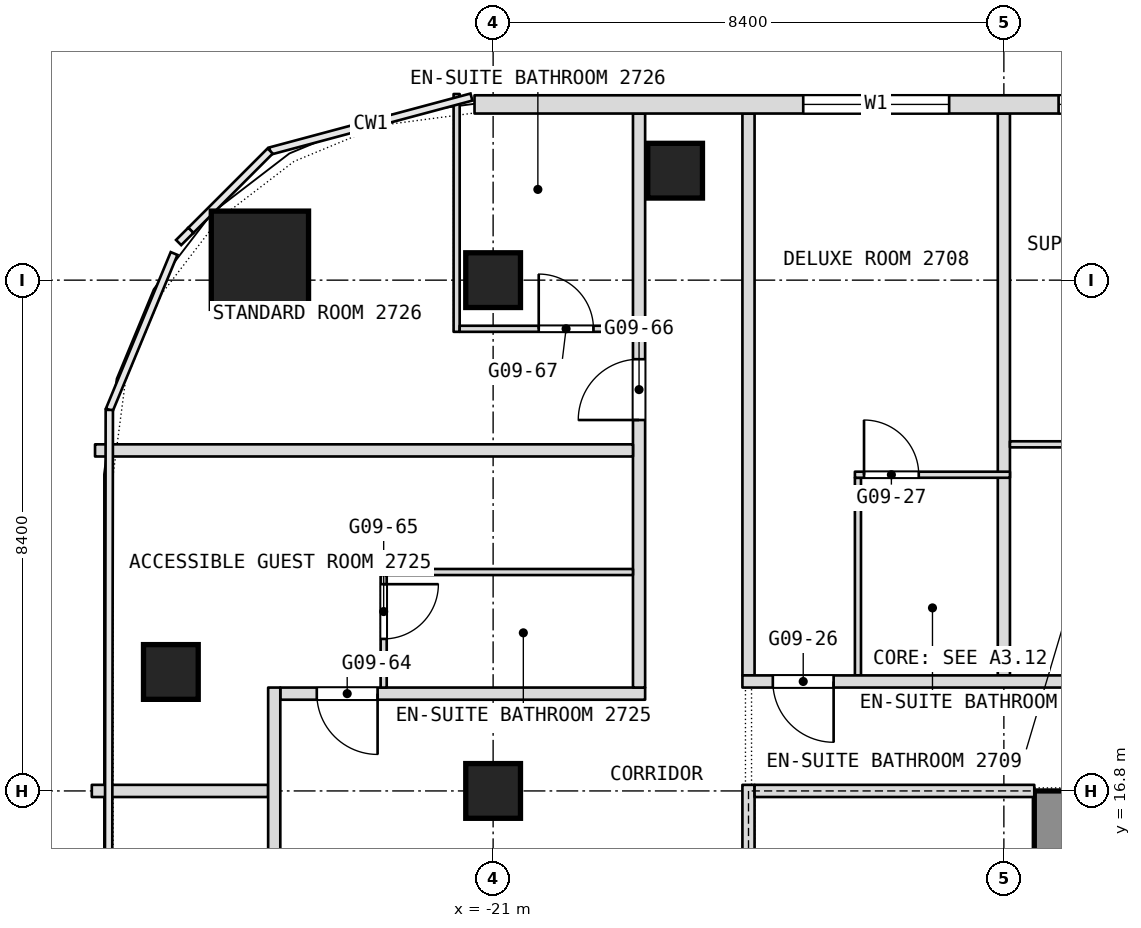
"""IFC4 building model, lengths in metres.
Left out: names, types, materials, properties, quantities, classifications, styles, units other than length and angle.
Written with IfcOpenShell. Run it as: python <this file> out.ifc"""

import sys

from ifc_helpers import new_model, si_unit, direction, frame, frame_2d, origin, origin_2d, place, context, subcontext, project, spatial, rectangle, extrude, element, fill, save


model = new_model("IFC4")
c1 = context("Model", 3, precision=1e-05, world=origin(), true_north=direction((0.0, 1.0)))
c2 = subcontext(c1, "Body", "Model", "MODEL_VIEW")
j1 = project(units=[si_unit("LENGTHUNIT", "METRE"), si_unit("PLANEANGLEUNIT", "RADIAN")], contexts=[c1])
p1 = place(None, origin())
s1 = spatial("IfcSite", under=j1, at=p1, CompositionType="ELEMENT")
p2 = place(p1, origin())
s2 = spatial("IfcBuilding", under=s1, at=p2, CompositionType="ELEMENT")
p3 = place(p2, frame((0.0, 0.0, 122.9)))
s3 = spatial("IfcBuildingStorey", under=s2, at=p3, CompositionType="ELEMENT", Elevation=122.9)
p4 = place(p3, frame((-11.6, 0.0, 0.0), z_axis=(0.0, 0.0, 1.0), x_axis=(0.0, 1.0, 0.0)))
e1 = element("IfcWall", 1, at=p4, inside=s3, PredefinedType="SHEAR", context=c2, shape_type="SweptSolid", body=[
    extrude(rectangle(XDim=16.8, YDim=1.0, at=frame_2d((8.4, 0.0))), origin(), (0.0, 0.0, 1.0), 3.6),
])
p5 = place(p4, frame((3.6, 0.0, 0.0)))
e2 = element("IfcOpeningElement", 2, at=p5, cuts=e1, PredefinedType="OPENING", context=c2, shape_type="SweptSolid", body=[
    extrude(rectangle(XDim=0.9, YDim=2.1, at=frame_2d((0.45, 1.05))), frame((0.0, 0.5, 0.0), z_axis=(0.0, -1.0, 0.0), x_axis=(1.0, 0.0, 0.0)), (0.0, 0.0, 1.0), 1.0),
])
p6 = place(p4, frame((6.825, 0.0, 0.0)))
e3 = element("IfcOpeningElement", 3, at=p6, cuts=e1, PredefinedType="OPENING", context=c2, shape_type="SweptSolid", body=[
    extrude(rectangle(XDim=1.2, YDim=2.1, at=frame_2d((0.6, 1.05))), frame((0.0, 0.5, 0.0), z_axis=(0.0, -1.0, 0.0), x_axis=(1.0, 0.0, 0.0)), (0.0, 0.0, 1.0), 1.0),
])
p7 = place(p4, frame((14.137, 0.0, 0.0)))
e4 = element("IfcOpeningElement", 4, at=p7, cuts=e1, PredefinedType="OPENING", context=c2, shape_type="SweptSolid", body=[
    extrude(rectangle(XDim=0.9, YDim=2.1, at=frame_2d((0.45, 1.05))), frame((0.0, 0.5, 0.0), z_axis=(0.0, -1.0, 0.0), x_axis=(1.0, 0.0, 0.0)), (0.0, 0.0, 1.0), 1.0),
])
p8 = place(p4, frame((11.512, 0.0, 0.0)))
e5 = element("IfcOpeningElement", 5, at=p8, cuts=e1, PredefinedType="OPENING", context=c2, shape_type="SweptSolid", body=[
    extrude(rectangle(XDim=0.9, YDim=2.1, at=frame_2d((0.45, 1.05))), frame((0.0, 0.5, 0.0), z_axis=(0.0, -1.0, 0.0), x_axis=(1.0, 0.0, 0.0)), (0.0, 0.0, 1.0), 1.0),
])
p9 = place(p4, frame((8.775, 0.0, 0.0)))
e6 = element("IfcOpeningElement", 6, at=p9, cuts=e1, PredefinedType="OPENING", context=c2, shape_type="SweptSolid", body=[
    extrude(rectangle(XDim=1.2, YDim=2.1, at=frame_2d((0.6, 1.05))), frame((0.0, 0.5, 0.0), z_axis=(0.0, -1.0, 0.0), x_axis=(1.0, 0.0, 0.0)), (0.0, 0.0, 1.0), 1.0),
])
p10 = place(p3, frame((-24.835, 25.535, 0.0), z_axis=(0.0, 0.0, 1.0), x_axis=(1.0, 0.0, 0.0)))
e7 = element("IfcColumn", 7, at=p10, inside=s3, PredefinedType="COLUMN", context=c2, shape_type="SweptSolid", body=[
    extrude(rectangle(XDim=1.6, YDim=1.6, at=origin_2d()), origin(), (0.0, 0.0, 1.0), 3.6),
])
for number, where, z_axis, x_axis in (
    (8, (-21.0, 16.8, 0.0), (0.0, 0.0, 1.0), (1.0, 0.0, 0.0)),
    (9, (-21.0, 25.2, 0.0), (0.0, 0.0, 1.0), (1.0, 0.0, 0.0)),
    (10, (-26.3, 18.756, 0.0), (0.0, 0.0, 1.0), (1.0, 0.0, 0.0)),
    (11, (-18.007, 27.0, 0.0), (0.0, 0.0, 1.0), (1.0, 0.0, 0.0)),
):
    element("IfcColumn", number, at=place(p3, frame(where, z_axis=z_axis, x_axis=x_axis)), inside=s3, PredefinedType="COLUMN", context=c2, shape_type="SweptSolid", body=[
        extrude(rectangle(XDim=0.9, YDim=0.9, at=origin_2d()), origin(), (0.0, 0.0, 1.0), 3.6),
    ])
p11 = place(p3, frame((-12.6, 18.7, 0.0), z_axis=(0.0, 0.0, 1.0), x_axis=(0.0, 1.0, 0.0)))
e12 = element("IfcWall", 12, at=p11, inside=s3, PredefinedType="PARTITIONING", context=c2, shape_type="SweptSolid", body=[
    extrude(rectangle(XDim=9.24, YDim=0.2, at=frame_2d((4.62, 0.0))), origin(), (0.0, 0.0, 1.0), 3.34),
])
p12 = place(p3, frame((-15.0, 18.7, 0.0), z_axis=(0.0, 0.0, 1.0), x_axis=(0.0, 1.0, 0.0)))
e13 = element("IfcWall", 13, at=p12, inside=s3, PredefinedType="PARTITIONING", context=c2, shape_type="SweptSolid", body=[
    extrude(rectangle(XDim=3.25, YDim=0.1, at=frame_2d((1.625, 0.0))), origin(), (0.0, 0.0, 1.0), 3.34),
])
p13 = place(p3, frame((-16.8, 18.7, 0.0), z_axis=(0.0, 0.0, 1.0), x_axis=(0.0, 1.0, 0.0)))
e14 = element("IfcWall", 14, at=p13, inside=s3, PredefinedType="PARTITIONING", context=c2, shape_type="SweptSolid", body=[
    extrude(rectangle(XDim=9.24, YDim=0.2, at=frame_2d((4.62, 0.0))), origin(), (0.0, 0.0, 1.0), 3.34),
])
p14 = place(p3, frame((-27.6, 16.8, 0.0), z_axis=(0.0, 0.0, 1.0), x_axis=(1.0, 0.0, 0.0)))
e15 = element("IfcWall", 15, at=p14, inside=s3, PredefinedType="PARTITIONING", context=c2, shape_type="SweptSolid", body=[
    extrude(rectangle(XDim=2.9, YDim=0.2, at=frame_2d((1.45, 0.0))), origin(), (0.0, 0.0, 1.0), 2.89),
])
p15 = place(p3, frame((-24.5, 18.4, 0.0), z_axis=(0.0, 0.0, 1.0), x_axis=(1.0, 0.0, 0.0)))
e16 = element("IfcWall", 16, at=p15, inside=s3, PredefinedType="PARTITIONING", context=c2, shape_type="SweptSolid", body=[
    extrude(rectangle(XDim=6.0, YDim=0.2, at=frame_2d((3.0, 0.0))), origin(), (0.0, 0.0, 1.0), 3.34),
])
p16 = place(p15, frame((0.6, 0.0, 0.0)))
e17 = element("IfcOpeningElement", 17, at=p16, cuts=e16, PredefinedType="OPENING", context=c2, shape_type="SweptSolid", body=[
    extrude(rectangle(XDim=1.0, YDim=2.1, at=frame_2d((0.5, 1.05))), frame((0.0, 0.1, 0.0), z_axis=(0.0, -1.0, 0.0), x_axis=(1.0, 0.0, 0.0)), (0.0, 0.0, 1.0), 0.2),
])
p17 = place(p3, frame((-18.6, 18.5, 0.0), z_axis=(0.0, 0.0, 1.0), x_axis=(0.0, 1.0, 0.0)))
e18 = element("IfcWall", 18, at=p17, inside=s3, PredefinedType="PARTITIONING", context=c2, shape_type="SweptSolid", body=[
    extrude(rectangle(XDim=9.44, YDim=0.2, at=frame_2d((4.72, 0.0))), origin(), (0.0, 0.0, 1.0), 3.34),
])
p18 = place(p17, frame((4.4, 0.0, 0.0)))
e19 = element("IfcOpeningElement", 19, at=p18, cuts=e18, PredefinedType="OPENING", context=c2, shape_type="SweptSolid", body=[
    extrude(rectangle(XDim=1.0, YDim=2.1, at=frame_2d((0.5, 1.05))), frame((0.0, 0.1, 0.0), z_axis=(0.0, -1.0, 0.0), x_axis=(1.0, 0.0, 0.0)), (0.0, 0.0, 1.0), 0.2),
])
p19 = place(p3, frame((-16.9, 18.6, 0.0), z_axis=(0.0, 0.0, 1.0), x_axis=(1.0, 0.0, 0.0)))
e20 = element("IfcWall", 20, at=p19, inside=s3, PredefinedType="PARTITIONING", context=c2, shape_type="SweptSolid", body=[
    extrude(rectangle(XDim=18.4, YDim=0.2, at=frame_2d((9.2, 0.0))), origin(), (0.0, 0.0, 1.0), 3.34),
])
p20 = place(p19, frame((0.5, 0.0, 0.0)))
e21 = element("IfcOpeningElement", 21, at=p20, cuts=e20, PredefinedType="OPENING", context=c2, shape_type="SweptSolid", body=[
    extrude(rectangle(XDim=1.0, YDim=2.1, at=frame_2d((0.5, 1.05))), frame((0.0, 0.1, 0.0), z_axis=(0.0, -1.0, 0.0), x_axis=(1.0, 0.0, 0.0)), (0.0, 0.0, 1.0), 0.2),
])
p21 = place(p19, frame((7.1, 0.0, 0.0)))
e22 = element("IfcOpeningElement", 22, at=p21, cuts=e20, PredefinedType="OPENING", context=c2, shape_type="SweptSolid", body=[
    extrude(rectangle(XDim=1.0, YDim=2.1, at=frame_2d((0.5, 1.05))), frame((0.0, 0.1, 0.0), z_axis=(0.0, -1.0, 0.0), x_axis=(1.0, 0.0, 0.0)), (0.0, 0.0, 1.0), 0.2),
])
p22 = place(p19, frame((8.9, 0.0, 0.0)))
e23 = element("IfcOpeningElement", 23, at=p22, cuts=e20, PredefinedType="OPENING", context=c2, shape_type="SweptSolid", body=[
    extrude(rectangle(XDim=1.0, YDim=2.1, at=frame_2d((0.5, 1.05))), frame((0.0, 0.1, 0.0), z_axis=(0.0, -1.0, 0.0), x_axis=(1.0, 0.0, 0.0)), (0.0, 0.0, 1.0), 0.2),
])
p23 = place(p19, frame((13.1, 0.0, 0.0)))
e24 = element("IfcOpeningElement", 24, at=p23, cuts=e20, PredefinedType="OPENING", context=c2, shape_type="SweptSolid", body=[
    extrude(rectangle(XDim=1.0, YDim=2.1, at=frame_2d((0.5, 1.05))), frame((0.0, 0.1, 0.0), z_axis=(0.0, -1.0, 0.0), x_axis=(1.0, 0.0, 0.0)), (0.0, 0.0, 1.0), 0.2),
])
p24 = place(p3, frame((-22.85, 20.4, 0.0), z_axis=(0.0, 0.0, 1.0), x_axis=(1.0, 0.0, 0.0)))
e25 = element("IfcWall", 25, at=p24, inside=s3, PredefinedType="PARTITIONING", context=c2, shape_type="SweptSolid", body=[
    extrude(rectangle(XDim=4.15, YDim=0.1, at=frame_2d((2.075, 0.0))), origin(), (0.0, 0.0, 1.0), 3.34),
])
p25 = place(p3, frame((-21.6, 24.35, 0.0), z_axis=(0.0, 0.0, 1.0), x_axis=(0.0, 1.0, 0.0)))
e26 = element("IfcWall", 26, at=p25, inside=s3, PredefinedType="PARTITIONING", context=c2, shape_type="SweptSolid", body=[
    extrude(rectangle(XDim=3.911, YDim=0.1, at=frame_2d((1.956, 0.0))), origin(), (0.0, 0.0, 1.0), 3.34),
])
p26 = place(p3, frame((-15.05, 22.0, 0.0), z_axis=(0.0, 0.0, 1.0), x_axis=(1.0, 0.0, 0.0)))
e27 = element("IfcWall", 27, at=p26, inside=s3, PredefinedType="PARTITIONING", context=c2, shape_type="SweptSolid", body=[
    extrude(rectangle(XDim=2.55, YDim=0.1, at=frame_2d((1.275, 0.0))), origin(), (0.0, 0.0, 1.0), 3.34),
])
p27 = place(p26, frame((0.15, 0.0, 0.0)))
e28 = element("IfcOpeningElement", 28, at=p27, cuts=e27, PredefinedType="OPENING", context=c2, shape_type="SweptSolid", body=[
    extrude(rectangle(XDim=0.9, YDim=2.1, at=frame_2d((0.45, 1.05))), frame((0.0, 0.05, 0.0), z_axis=(0.0, -1.0, 0.0), x_axis=(1.0, 0.0, 0.0)), (0.0, 0.0, 1.0), 0.1),
])
p28 = place(p3, frame((-27.547, 22.4, 0.0), z_axis=(0.0, 0.0, 1.0), x_axis=(1.0, 0.0, 0.0)))
e29 = element("IfcWall", 29, at=p28, inside=s3, PredefinedType="PARTITIONING", context=c2, shape_type="SweptSolid", body=[
    extrude(rectangle(XDim=8.847, YDim=0.2, at=frame_2d((4.424, 0.0))), origin(), (0.0, 0.0, 1.0), 3.34),
])
p29 = place(p3, frame((-12.5, 22.5, 0.0), z_axis=(0.0, 0.0, 1.0), x_axis=(1.0, 0.0, 0.0)))
e30 = element("IfcWall", 30, at=p29, inside=s3, PredefinedType="PARTITIONING", context=c2, shape_type="SweptSolid", body=[
    extrude(rectangle(XDim=2.25, YDim=0.1, at=frame_2d((1.125, 0.0))), origin(), (0.0, 0.0, 1.0), 3.34),
])
p30 = place(p29, frame((1.2, 0.0, 0.0)))
e31 = element("IfcOpeningElement", 31, at=p30, cuts=e30, PredefinedType="OPENING", context=c2, shape_type="SweptSolid", body=[
    extrude(rectangle(XDim=0.9, YDim=2.1, at=frame_2d((0.45, 1.05))), frame((0.0, 0.05, 0.0), z_axis=(0.0, -1.0, 0.0), x_axis=(1.0, 0.0, 0.0)), (0.0, 0.0, 1.0), 0.1),
])
p31 = place(p3, frame((-22.8, 18.5, 0.0), z_axis=(0.0, 0.0, 1.0), x_axis=(0.0, 1.0, 0.0)))
e32 = element("IfcWall", 32, at=p31, inside=s3, PredefinedType="PARTITIONING", context=c2, shape_type="SweptSolid", body=[
    extrude(rectangle(XDim=1.85, YDim=0.1, at=frame_2d((0.925, 0.0))), origin(), (0.0, 0.0, 1.0), 3.34),
])
p32 = place(p31, frame((0.8, 0.0, 0.0)))
e33 = element("IfcOpeningElement", 33, at=p32, cuts=e32, PredefinedType="OPENING", context=c2, shape_type="SweptSolid", body=[
    extrude(rectangle(XDim=0.9, YDim=2.1, at=frame_2d((0.45, 1.05))), frame((0.0, 0.05, 0.0), z_axis=(0.0, -1.0, 0.0), x_axis=(1.0, 0.0, 0.0)), (0.0, 0.0, 1.0), 0.1),
])
p33 = place(p3, frame((-21.55, 24.4, 0.0), z_axis=(0.0, 0.0, 1.0), x_axis=(1.0, 0.0, 0.0)))
e34 = element("IfcWall", 34, at=p33, inside=s3, PredefinedType="PARTITIONING", context=c2, shape_type="SweptSolid", body=[
    extrude(rectangle(XDim=2.85, YDim=0.1, at=frame_2d((1.425, 0.0))), origin(), (0.0, 0.0, 1.0), 3.34),
])
p34 = place(p33, frame((1.3, 0.0, 0.0)))
e35 = element("IfcOpeningElement", 35, at=p34, cuts=e34, PredefinedType="OPENING", context=c2, shape_type="SweptSolid", body=[
    extrude(rectangle(XDim=0.9, YDim=2.1, at=frame_2d((0.45, 1.05))), frame((0.0, 0.05, 0.0), z_axis=(0.0, -1.0, 0.0), x_axis=(1.0, 0.0, 0.0)), (0.0, 0.0, 1.0), 0.1),
])
p35 = place(p3, frame((-24.6, 6.9, 0.0), z_axis=(0.0, 0.0, 1.0), x_axis=(0.0, 1.0, 0.0)))
e36 = element("IfcWall", 36, at=p35, inside=s3, PredefinedType="PARTITIONING", context=c2, shape_type="SweptSolid", body=[
    extrude(rectangle(XDim=11.6, YDim=0.2, at=frame_2d((5.8, 0.0))), origin(), (0.0, 0.0, 1.0), 3.34),
])
p36 = place(p35, frame((5.45, 0.0, 0.0)))
e37 = element("IfcOpeningElement", 37, at=p36, cuts=e36, PredefinedType="OPENING", context=c2, shape_type="SweptSolid", body=[
    extrude(rectangle(XDim=1.8, YDim=2.1, at=frame_2d((0.9, 1.05))), frame((0.0, 0.1, 0.0), z_axis=(0.0, -1.0, 0.0), x_axis=(1.0, 0.0, 0.0)), (0.0, 0.0, 1.0), 0.2),
])
p37 = place(p35, frame((0.3, 0.0, 0.0)))
e38 = element("IfcOpeningElement", 38, at=p37, cuts=e36, PredefinedType="OPENING", context=c2, shape_type="SweptSolid", body=[
    extrude(rectangle(XDim=1.0, YDim=2.1, at=frame_2d((0.5, 1.05))), frame((0.0, 0.1, 0.0), z_axis=(0.0, -1.0, 0.0), x_axis=(1.0, 0.0, 0.0)), (0.0, 0.0, 1.0), 0.2),
])
p38 = place(p3, frame((21.306, 28.09, 0.0), z_axis=(0.0, 0.0, 1.0), x_axis=(-1.0, 0.0, 0.0)))
e39 = element("IfcWall", 39, at=p38, inside=s3, PredefinedType="NOTDEFINED", context=c2, shape_type="SweptSolid", body=[
    extrude(rectangle(XDim=42.612, YDim=0.3, at=frame_2d((21.306, 0.0))), origin(), (0.0, 0.0, 1.0), 3.6),
])
p39 = place(p38, frame((5.406, 0.0, 0.9)))
e40 = element("IfcOpeningElement", 40, at=p39, cuts=e39, PredefinedType="OPENING", context=c2, shape_type="SweptSolid", body=[
    extrude(rectangle(XDim=2.4, YDim=2.1, at=frame_2d((1.2, 1.05))), frame((0.0, 0.15, 0.0), z_axis=(0.0, -1.0, 0.0), x_axis=(1.0, 0.0, 0.0)), (0.0, 0.0, 1.0), 0.3),
])
p40 = place(p38, frame((9.606, 0.0, 0.9)))
e41 = element("IfcOpeningElement", 41, at=p40, cuts=e39, PredefinedType="OPENING", context=c2, shape_type="SweptSolid", body=[
    extrude(rectangle(XDim=2.4, YDim=2.1, at=frame_2d((1.2, 1.05))), frame((0.0, 0.15, 0.0), z_axis=(0.0, -1.0, 0.0), x_axis=(1.0, 0.0, 0.0)), (0.0, 0.0, 1.0), 0.3),
])
p41 = place(p38, frame((13.806, 0.0, 0.9)))
e42 = element("IfcOpeningElement", 42, at=p41, cuts=e39, PredefinedType="OPENING", context=c2, shape_type="SweptSolid", body=[
    extrude(rectangle(XDim=2.4, YDim=2.1, at=frame_2d((1.2, 1.05))), frame((0.0, 0.15, 0.0), z_axis=(0.0, -1.0, 0.0), x_axis=(1.0, 0.0, 0.0)), (0.0, 0.0, 1.0), 0.3),
])
p42 = place(p38, frame((18.006, 0.0, 0.9)))
e43 = element("IfcOpeningElement", 43, at=p42, cuts=e39, PredefinedType="OPENING", context=c2, shape_type="SweptSolid", body=[
    extrude(rectangle(XDim=2.4, YDim=2.1, at=frame_2d((1.2, 1.05))), frame((0.0, 0.15, 0.0), z_axis=(0.0, -1.0, 0.0), x_axis=(1.0, 0.0, 0.0)), (0.0, 0.0, 1.0), 0.3),
])
p43 = place(p38, frame((22.206, 0.0, 0.9)))
e44 = element("IfcOpeningElement", 44, at=p43, cuts=e39, PredefinedType="OPENING", context=c2, shape_type="SweptSolid", body=[
    extrude(rectangle(XDim=2.4, YDim=2.1, at=frame_2d((1.2, 1.05))), frame((0.0, 0.15, 0.0), z_axis=(0.0, -1.0, 0.0), x_axis=(1.0, 0.0, 0.0)), (0.0, 0.0, 1.0), 0.3),
])
p44 = place(p38, frame((26.406, 0.0, 0.9)))
e45 = element("IfcOpeningElement", 45, at=p44, cuts=e39, PredefinedType="OPENING", context=c2, shape_type="SweptSolid", body=[
    extrude(rectangle(XDim=2.4, YDim=2.1, at=frame_2d((1.2, 1.05))), frame((0.0, 0.15, 0.0), z_axis=(0.0, -1.0, 0.0), x_axis=(1.0, 0.0, 0.0)), (0.0, 0.0, 1.0), 0.3),
])
p45 = place(p38, frame((30.606, 0.0, 0.9)))
e46 = element("IfcOpeningElement", 46, at=p45, cuts=e39, PredefinedType="OPENING", context=c2, shape_type="SweptSolid", body=[
    extrude(rectangle(XDim=2.4, YDim=2.1, at=frame_2d((1.2, 1.05))), frame((0.0, 0.15, 0.0), z_axis=(0.0, -1.0, 0.0), x_axis=(1.0, 0.0, 0.0)), (0.0, 0.0, 1.0), 0.3),
])
p46 = place(p38, frame((34.806, 0.0, 0.9)))
e47 = element("IfcOpeningElement", 47, at=p46, cuts=e39, PredefinedType="OPENING", context=c2, shape_type="SweptSolid", body=[
    extrude(rectangle(XDim=2.4, YDim=2.1, at=frame_2d((1.2, 1.05))), frame((0.0, 0.15, 0.0), z_axis=(0.0, -1.0, 0.0), x_axis=(1.0, 0.0, 0.0)), (0.0, 0.0, 1.0), 0.3),
])
p47 = place(p3, frame((-16.8, -0.1, 0.0), z_axis=(0.0, 0.0, 1.0), x_axis=(0.0, 1.0, 0.0)))
e48 = element("IfcWall", 48, at=p47, inside=s3, PredefinedType="PARTITIONING", context=c2, shape_type="SweptSolid", body=[
    extrude(rectangle(XDim=17.0, YDim=0.2, at=frame_2d((8.5, 0.0))), origin(), (0.0, 0.0, 1.0), 3.34),
])
p48 = place(p47, frame((2.2, 0.0, 0.0)))
e49 = element("IfcOpeningElement", 49, at=p48, cuts=e48, PredefinedType="OPENING", context=c2, shape_type="SweptSolid", body=[
    extrude(rectangle(XDim=1.8, YDim=2.1, at=frame_2d((0.9, 1.05))), frame((0.0, 0.1, 0.0), z_axis=(0.0, -1.0, 0.0), x_axis=(1.0, 0.0, 0.0)), (0.0, 0.0, 1.0), 0.2),
])
p49 = place(p47, frame((7.2, 0.0, 0.0)))
e50 = element("IfcOpeningElement", 50, at=p49, cuts=e48, PredefinedType="OPENING", context=c2, shape_type="SweptSolid", body=[
    extrude(rectangle(XDim=1.8, YDim=2.1, at=frame_2d((0.9, 1.05))), frame((0.0, 0.1, 0.0), z_axis=(0.0, -1.0, 0.0), x_axis=(1.0, 0.0, 0.0)), (0.0, 0.0, 1.0), 0.2),
])
p50 = place(p3, frame((-16.7, 16.8, 0.0), z_axis=(0.0, 0.0, 1.0), x_axis=(1.0, 0.0, 0.0)))
e51 = element("IfcWall", 51, at=p50, inside=s3, PredefinedType="PARTITIONING", context=c2, shape_type="SweptSolid", body=[
    extrude(rectangle(XDim=4.6, YDim=0.2, at=frame_2d((2.3, 0.0))), origin(), (0.0, 0.0, 1.0), 2.89),
])
p51 = place(p16, origin())
e52 = element("IfcDoor", 52, at=p51, inside=s3, OperationType="SINGLE_SWING_RIGHT", PredefinedType="DOOR", context=c2, shape_type="SweptSolid", body=[
    extrude(rectangle(XDim=1.0, YDim=2.1, at=frame_2d((0.5, 1.05))), frame((0.0, 0.025, 0.0), z_axis=(0.0, -1.0, 0.0), x_axis=(1.0, 0.0, 0.0)), (0.0, 0.0, 1.0), 0.05),
])
fill(e17, e52)
p52 = place(p18, origin())
e53 = element("IfcDoor", 53, at=p52, inside=s3, OperationType="SINGLE_SWING_LEFT", PredefinedType="DOOR", context=c2, shape_type="SweptSolid", body=[
    extrude(rectangle(XDim=1.0, YDim=2.1, at=frame_2d((0.5, 1.05))), frame((0.0, 0.025, 0.0), z_axis=(0.0, -1.0, 0.0), x_axis=(1.0, 0.0, 0.0)), (0.0, 0.0, 1.0), 0.05),
])
fill(e19, e53)
p53 = place(p20, origin())
e54 = element("IfcDoor", 54, at=p53, inside=s3, OperationType="SINGLE_SWING_LEFT", PredefinedType="DOOR", context=c2, shape_type="SweptSolid", body=[
    extrude(rectangle(XDim=1.0, YDim=2.1, at=frame_2d((0.5, 1.05))), frame((0.0, 0.025, 0.0), z_axis=(0.0, -1.0, 0.0), x_axis=(1.0, 0.0, 0.0)), (0.0, 0.0, 1.0), 0.05),
])
fill(e21, e54)
p54 = place(p27, origin())
e55 = element("IfcDoor", 55, at=p54, inside=s3, OperationType="SINGLE_SWING_RIGHT", PredefinedType="DOOR", context=c2, shape_type="SweptSolid", body=[
    extrude(rectangle(XDim=0.9, YDim=2.1, at=frame_2d((0.45, 1.05))), frame((0.0, 0.025, 0.0), z_axis=(0.0, -1.0, 0.0), x_axis=(1.0, 0.0, 0.0)), (0.0, 0.0, 1.0), 0.05),
])
fill(e28, e55)
p55 = place(p32, origin())
e56 = element("IfcDoor", 56, at=p55, inside=s3, OperationType="SINGLE_SWING_LEFT", PredefinedType="DOOR", context=c2, shape_type="SweptSolid", body=[
    extrude(rectangle(XDim=0.9, YDim=2.1, at=frame_2d((0.45, 1.05))), frame((0.0, 0.025, 0.0), z_axis=(0.0, -1.0, 0.0), x_axis=(1.0, 0.0, 0.0)), (0.0, 0.0, 1.0), 0.05),
])
fill(e33, e56)
p56 = place(p34, origin())
e57 = element("IfcDoor", 57, at=p56, inside=s3, OperationType="SINGLE_SWING_LEFT", PredefinedType="DOOR", context=c2, shape_type="SweptSolid", body=[
    extrude(rectangle(XDim=0.9, YDim=2.1, at=frame_2d((0.45, 1.05))), frame((0.0, 0.025, 0.0), z_axis=(0.0, -1.0, 0.0), x_axis=(1.0, 0.0, 0.0)), (0.0, 0.0, 1.0), 0.05),
])
fill(e35, e57)
p57 = place(p45, origin())
e58 = element("IfcWindow", 58, at=p57, inside=s3, PartitioningType="SINGLE_PANEL", PredefinedType="WINDOW", context=c2, shape_type="SweptSolid", body=[
    extrude(rectangle(XDim=2.4, YDim=2.1, at=frame_2d((1.2, 1.05))), frame((0.0, 0.03, 0.0), z_axis=(0.0, -1.0, 0.0), x_axis=(1.0, 0.0, 0.0)), (0.0, 0.0, 1.0), 0.06),
])
fill(e46, e58)
p58 = place(p46, origin())
e59 = element("IfcWindow", 59, at=p58, inside=s3, PartitioningType="SINGLE_PANEL", PredefinedType="WINDOW", context=c2, shape_type="SweptSolid", body=[
    extrude(rectangle(XDim=2.4, YDim=2.1, at=frame_2d((1.2, 1.05))), frame((0.0, 0.03, 0.0), z_axis=(0.0, -1.0, 0.0), x_axis=(1.0, 0.0, 0.0)), (0.0, 0.0, 1.0), 0.06),
])
fill(e47, e59)
save(model, sys.argv[1])
